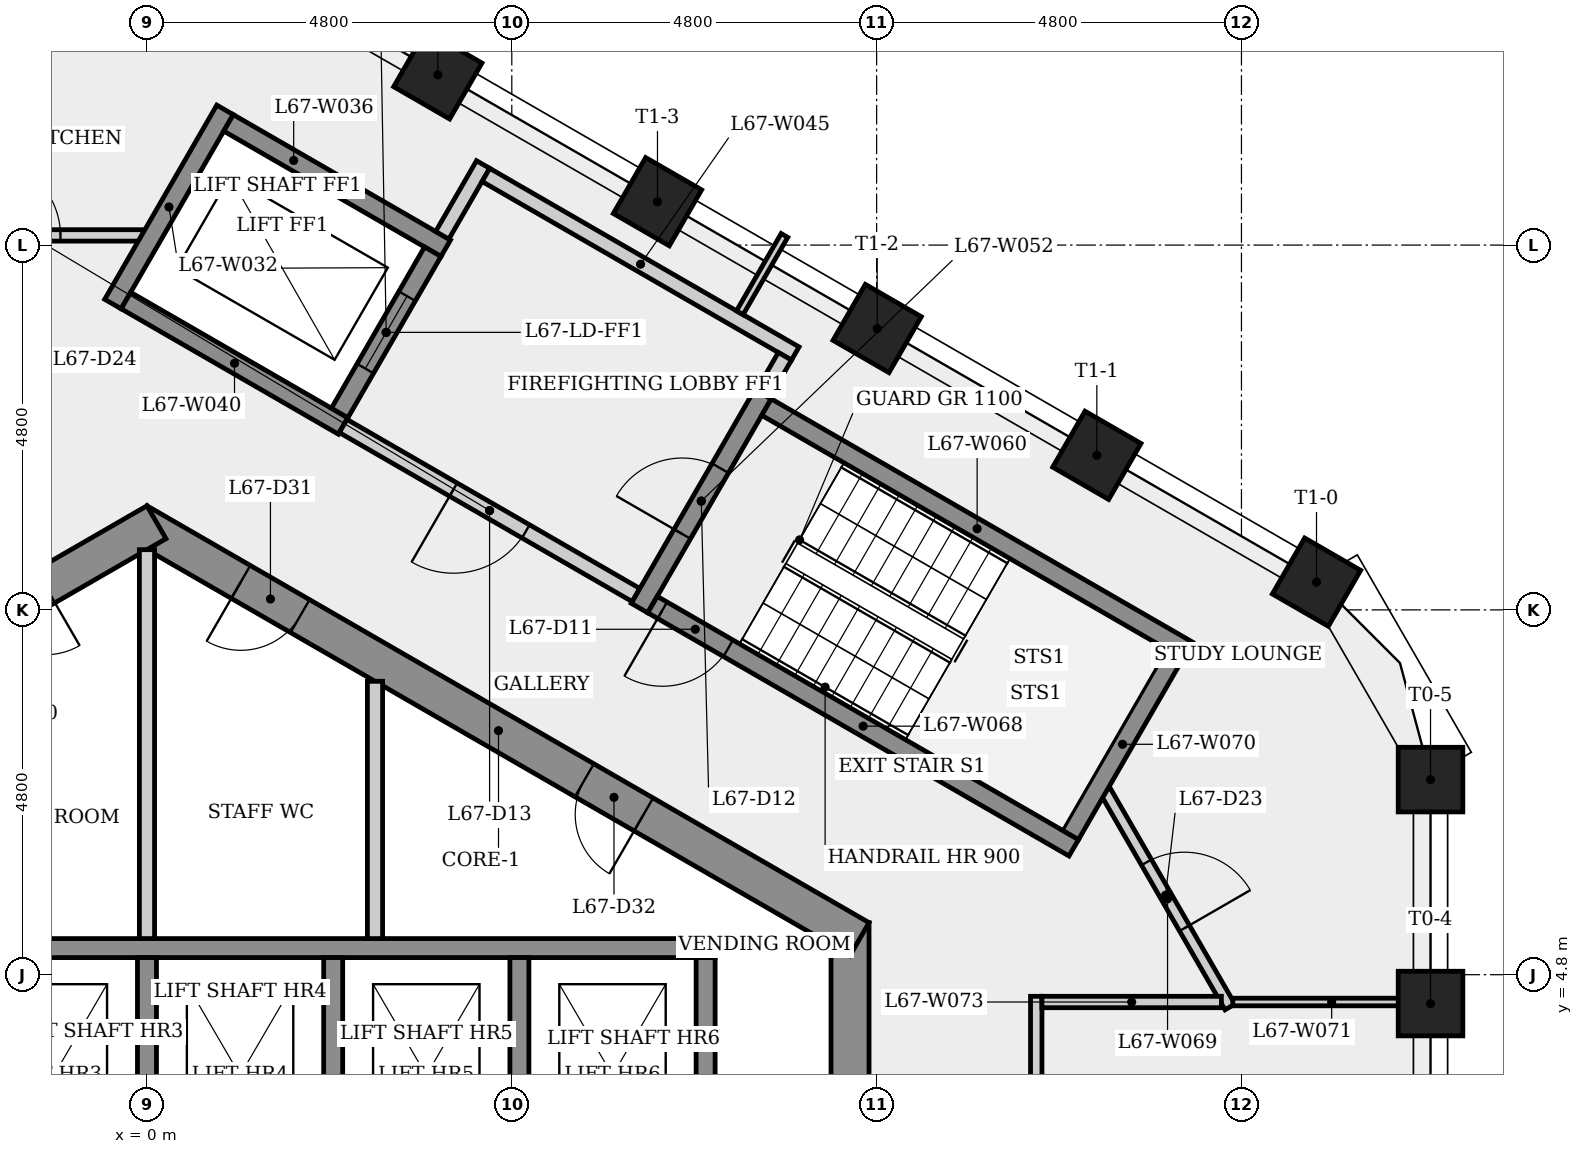
"""IFC4 building model, lengths in metres.
Left out: names, types, materials, properties, quantities, classifications, styles, units other than length and angle.
Written with IfcOpenShell. Run it as: python <this file> out.ifc"""

import sys

from ifc_helpers import new_model, si_unit, direction, frame, frame_2d, origin, origin_2d, place, context, subcontext, project, spatial, rectangle, extrude, element, fill, save


model = new_model("IFC4")
c1 = context("Model", 3, precision=1e-05, world=origin(), true_north=direction((0.0, 1.0)))
c2 = subcontext(c1, "Body", "Model", "MODEL_VIEW")
j1 = project(units=[si_unit("LENGTHUNIT", "METRE"), si_unit("PLANEANGLEUNIT", "RADIAN")], contexts=[c1])
p1 = place(None, origin())
s1 = spatial("IfcSite", under=j1, at=p1, CompositionType="ELEMENT")
p2 = place(p1, origin())
s2 = spatial("IfcBuilding", under=s1, at=p2, CompositionType="ELEMENT")
p3 = place(p2, frame((0.0, 0.0, 249.5)))
s3 = spatial("IfcBuildingStorey", under=s2, at=p3, CompositionType="ELEMENT", Elevation=249.5)
p4 = place(p3, frame((9.25, -5.485, 0.0), z_axis=(0.0, 0.0, 1.0), x_axis=(0.0, 1.0, 0.0)))
e1 = element("IfcWall", 1, at=p4, inside=s3, PredefinedType="SHEAR", context=c2, shape_type="SweptSolid", body=[
    extrude(rectangle(XDim=10.97, YDim=0.5, at=frame_2d((5.485, 0.0))), origin(), (0.0, 0.0, 1.0), 3.4),
])
p5 = place(p4, frame((4.685, 0.0, 0.0)))
e2 = element("IfcOpeningElement", 2, at=p5, cuts=e1, PredefinedType="OPENING", context=c2, shape_type="SweptSolid", body=[
    extrude(rectangle(XDim=1.6, YDim=2.1, at=frame_2d((0.8, 1.05))), frame((0.0, 0.26, 0.0), z_axis=(0.0, -1.0, 0.0), x_axis=(1.0, 0.0, 0.0)), (0.0, 0.0, 1.0), 0.52),
])
p6 = place(p3, frame((9.375, 5.268, 0.0), z_axis=(0.0, 0.0, 1.0), x_axis=(-0.866023993627, 0.500002442456, 0.0)))
e3 = element("IfcWall", 3, at=p6, inside=s3, PredefinedType="SHEAR", context=c2, shape_type="SweptSolid", body=[
    extrude(rectangle(XDim=10.97, YDim=0.5, at=frame_2d((5.485, 0.0))), origin(), (0.0, 0.0, 1.0), 3.4),
])
p7 = place(p6, frame((8.5, 0.0, 0.0)))
e4 = element("IfcOpeningElement", 4, at=p7, cuts=e3, PredefinedType="OPENING", context=c2, shape_type="SweptSolid", body=[
    extrude(rectangle(XDim=0.9, YDim=2.1, at=frame_2d((0.45, 1.05))), frame((0.0, 0.26, 0.0), z_axis=(0.0, -1.0, 0.0), x_axis=(1.0, 0.0, 0.0)), (0.0, 0.0, 1.0), 0.52),
])
p8 = place(p6, frame((3.28, 0.0, 0.0)))
e5 = element("IfcOpeningElement", 5, at=p8, cuts=e3, PredefinedType="OPENING", context=c2, shape_type="SweptSolid", body=[
    extrude(rectangle(XDim=0.9, YDim=2.1, at=frame_2d((0.45, 1.05))), frame((0.0, 0.26, 0.0), z_axis=(0.0, -1.0, 0.0), x_axis=(1.0, 0.0, 0.0)), (0.0, 0.0, 1.0), 0.52),
])
p9 = place(p3, frame((0.125, 10.753, 0.0), z_axis=(0.0, 0.0, 1.0), x_axis=(-0.866023993627, -0.500002442456, 0.0)))
e6 = element("IfcWall", 6, at=p9, inside=s3, PredefinedType="SHEAR", context=c2, shape_type="SweptSolid", body=[
    extrude(rectangle(XDim=10.97, YDim=0.5, at=frame_2d((5.485, 0.0))), origin(), (0.0, 0.0, 1.0), 3.4),
])
p10 = place(p9, frame((8.581, 0.0, 0.0)))
e7 = element("IfcOpeningElement", 7, at=p10, cuts=e6, PredefinedType="OPENING", context=c2, shape_type="SweptSolid", body=[
    extrude(rectangle(XDim=0.9, YDim=2.1, at=frame_2d((0.45, 1.05))), frame((0.0, 0.26, 0.0), z_axis=(0.0, -1.0, 0.0), x_axis=(1.0, 0.0, 0.0)), (0.0, 0.0, 1.0), 0.52),
])
p11 = place(p9, frame((1.687, 0.0, 0.0)))
e8 = element("IfcOpeningElement", 8, at=p11, cuts=e6, PredefinedType="OPENING", context=c2, shape_type="SweptSolid", body=[
    extrude(rectangle(XDim=0.9, YDim=2.1, at=frame_2d((0.45, 1.05))), frame((0.0, 0.26, 0.0), z_axis=(0.0, -1.0, 0.0), x_axis=(1.0, 0.0, 0.0)), (0.0, 0.0, 1.0), 0.52),
])
for number, where, z_axis, x_axis in (
    (9, (16.887, 4.42, 0.0), (0.0, 0.0, 1.0), (1.0, 0.0, 0.0)),
    (10, (16.887, 7.367, 0.0), (0.0, 0.0, 1.0), (1.0, 0.0, 0.0)),
    (11, (15.387, 9.965, 0.0), (0.0, 0.0, 1.0), (0.5, 0.866, 0.0)),
    (12, (12.497, 11.634, 0.0), (0.0, 0.0, 1.0), (0.5, 0.866, 0.0)),
    (13, (9.607, 13.302, 0.0), (0.0, 0.0, 1.0), (0.5, 0.866, 0.0)),
    (14, (6.717, 14.971, 0.0), (0.0, 0.0, 1.0), (0.5, 0.866, 0.0)),
    (15, (3.826, 16.64, 0.0), (0.0, 0.0, 1.0), (0.5, 0.866, 0.0)),
):
    element("IfcColumn", number, at=place(p3, frame(where, z_axis=z_axis, x_axis=x_axis)), inside=s3, PredefinedType="COLUMN", context=c2, shape_type="SweptSolid", body=[
        extrude(rectangle(XDim=0.85, YDim=0.85, at=origin_2d()), origin(), (0.0, 0.0, 1.0), 3.4),
    ])
p12 = place(p3, frame((-7.225, 5.15, 0.0), z_axis=(0.0, 0.0, 1.0), x_axis=(1.0, 0.0, 0.0)))
e16 = element("IfcWall", 16, at=p12, inside=s3, PredefinedType="SHEAR", context=c2, shape_type="SweptSolid", body=[
    extrude(rectangle(XDim=14.7, YDim=0.25, at=frame_2d((7.35, 0.0))), origin(), (0.0, 0.0, 1.0), 3.0),
])
p13 = place(p3, frame((-3.335, 14.528, 0.0), z_axis=(0.0, 0.0, 1.0), x_axis=(1.0, 0.0, 0.0)))
e17 = element("IfcWall", 17, at=p13, inside=s3, PredefinedType="PARTITIONING", context=c2, shape_type="SweptSolid", body=[
    extrude(rectangle(XDim=3.283, YDim=0.15, at=frame_2d((1.642, 0.0))), origin(), (0.0, 0.0, 1.0), 3.0),
])
p14 = place(p13, frame((1.197, 0.0, 0.0)))
e18 = element("IfcOpeningElement", 18, at=p14, cuts=e17, PredefinedType="OPENING", context=c2, shape_type="SweptSolid", body=[
    extrude(rectangle(XDim=1.0, YDim=2.1, at=frame_2d((0.5, 1.05))), frame((0.0, 0.085, 0.0), z_axis=(0.0, -1.0, 0.0), x_axis=(1.0, 0.0, 0.0)), (0.0, 0.0, 1.0), 0.17),
])
p15 = place(p3, frame((-0.448, 13.624, 0.0), z_axis=(0.0, 0.0, 1.0), x_axis=(0.500037662692, 0.866003658127, 0.0)))
e19 = element("IfcWall", 19, at=p15, inside=s3, PredefinedType="SHEAR", context=c2, shape_type="SweptSolid", body=[
    extrude(rectangle(XDim=2.95, YDim=0.25, at=frame_2d((1.475, 0.0))), origin(), (0.0, 0.0, 1.0), 3.0),
])
p16 = place(p3, frame((0.0, 5.025, 0.0), z_axis=(0.0, 0.0, 1.0), x_axis=(0.0, -1.0, 0.0)))
e20 = element("IfcWall", 20, at=p16, inside=s3, PredefinedType="SHEAR", context=c2, shape_type="SweptSolid", body=[
    extrude(rectangle(XDim=3.1, YDim=0.25, at=frame_2d((1.55, 0.0))), origin(), (0.0, 0.0, 1.0), 3.4),
])
p17 = place(p3, frame((0.0, 10.392, 0.0), z_axis=(0.0, 0.0, 1.0), x_axis=(0.0, -1.0, 0.0)))
e21 = element("IfcWall", 21, at=p17, inside=s3, PredefinedType="PARTITIONING", context=c2, shape_type="SweptSolid", body=[
    extrude(rectangle(XDim=5.117, YDim=0.2, at=frame_2d((2.559, 0.0))), origin(), (0.0, 0.0, 1.0), 3.0),
])
p18 = place(p3, frame((1.073, 16.008, 0.0), z_axis=(0.0, 0.0, 1.0), x_axis=(0.866040211805, -0.499974350878, 0.0)))
e22 = element("IfcWall", 22, at=p18, inside=s3, PredefinedType="SHEAR", context=c2, shape_type="SweptSolid", body=[
    extrude(rectangle(XDim=3.3, YDim=0.25, at=frame_2d((1.65, 0.0))), origin(), (0.0, 0.0, 1.0), 3.0),
])
p19 = place(p3, frame((2.45, 5.025, 0.0), z_axis=(0.0, 0.0, 1.0), x_axis=(0.0, -1.0, 0.0)))
e23 = element("IfcWall", 23, at=p19, inside=s3, PredefinedType="SHEAR", context=c2, shape_type="SweptSolid", body=[
    extrude(rectangle(XDim=3.1, YDim=0.25, at=frame_2d((1.55, 0.0))), origin(), (0.0, 0.0, 1.0), 3.4),
])
p20 = place(p3, frame((2.581, 12.02, 0.0), z_axis=(0.0, 0.0, 1.0), x_axis=(-0.866040211805, 0.499974350878, 0.0)))
e24 = element("IfcWall", 24, at=p20, inside=s3, PredefinedType="SHEAR", context=c2, shape_type="SweptSolid", body=[
    extrude(rectangle(XDim=3.3, YDim=0.25, at=frame_2d((1.65, 0.0))), origin(), (0.0, 0.0, 1.0), 3.0),
])
p21 = place(p3, frame((2.535, 12.191, 0.0), z_axis=(0.0, 0.0, 1.0), x_axis=(0.500061746146, 0.865989751695, 0.0)))
e25 = element("IfcWall", 25, at=p21, inside=s3, PredefinedType="SHEAR", context=c2, shape_type="SweptSolid", body=[
    extrude(rectangle(XDim=2.45, YDim=0.25, at=frame_2d((1.225, 0.0))), origin(), (0.0, 0.0, 1.0), 3.4),
])
p22 = place(p21, frame((0.675, 0.0, 0.0)))
e26 = element("IfcOpeningElement", 26, at=p22, cuts=e25, PredefinedType="OPENING", context=c2, shape_type="SweptSolid", body=[
    extrude(rectangle(XDim=1.1, YDim=2.1, at=frame_2d((0.55, 1.05))), frame((0.0, 0.135, 0.0), z_axis=(0.0, -1.0, 0.0), x_axis=(1.0, 0.0, 0.0)), (0.0, 0.0, 1.0), 0.27),
])
p23 = place(p3, frame((3.0, 8.66, 0.0), z_axis=(0.0, 0.0, 1.0), x_axis=(0.0, -1.0, 0.0)))
e27 = element("IfcWall", 27, at=p23, inside=s3, PredefinedType="PARTITIONING", context=c2, shape_type="SweptSolid", body=[
    extrude(rectangle(XDim=3.385, YDim=0.2, at=frame_2d((1.693, 0.0))), origin(), (0.0, 0.0, 1.0), 3.0),
])
p24 = place(p3, frame((3.885, 14.529, 0.0), z_axis=(0.0, 0.0, 1.0), x_axis=(0.499997628298, 0.866026773083, 0.0)))
e28 = element("IfcWall", 28, at=p24, inside=s3, PredefinedType="PARTITIONING", context=c2, shape_type="SweptSolid", body=[
    extrude(rectangle(XDim=1.075, YDim=0.2, at=frame_2d((0.538, 0.0))), origin(), (0.0, 0.0, 1.0), 3.0),
])
p25 = place(p3, frame((4.459, 15.323, 0.0), z_axis=(0.0, 0.0, 1.0), x_axis=(0.866016039709, -0.500016218704, 0.0)))
e29 = element("IfcWall", 29, at=p25, inside=s3, PredefinedType="PARTITIONING", context=c2, shape_type="SweptSolid", body=[
    extrude(rectangle(XDim=4.7, YDim=0.2, at=frame_2d((2.35, 0.0))), origin(), (0.0, 0.0, 1.0), 3.0),
])
p26 = place(p3, frame((4.9, 5.025, 0.0), z_axis=(0.0, 0.0, 1.0), x_axis=(0.0, -1.0, 0.0)))
e30 = element("IfcWall", 30, at=p26, inside=s3, PredefinedType="SHEAR", context=c2, shape_type="SweptSolid", body=[
    extrude(rectangle(XDim=3.1, YDim=0.25, at=frame_2d((1.55, 0.0))), origin(), (0.0, 0.0, 1.0), 3.4),
])
p27 = place(p3, frame((6.435, 9.795, 0.0), z_axis=(0.0, 0.0, 1.0), x_axis=(-0.866012907634, 0.500021643343, 0.0)))
e31 = element("IfcWall", 31, at=p27, inside=s3, PredefinedType="PARTITIONING", context=c2, shape_type="SweptSolid", body=[
    extrude(rectangle(XDim=4.45, YDim=0.2, at=frame_2d((2.225, 0.0))), origin(), (0.0, 0.0, 1.0), 3.0),
])
p28 = place(p27, frame((1.675, 0.0, 0.0)))
e32 = element("IfcOpeningElement", 32, at=p28, cuts=e31, PredefinedType="OPENING", context=c2, shape_type="SweptSolid", body=[
    extrude(rectangle(XDim=1.1, YDim=2.1, at=frame_2d((0.55, 1.05))), frame((0.0, 0.11, 0.0), z_axis=(0.0, -1.0, 0.0), x_axis=(1.0, 0.0, 0.0)), (0.0, 0.0, 1.0), 0.22),
])
p29 = place(p3, frame((6.48, 9.624, 0.0), z_axis=(0.0, 0.0, 1.0), x_axis=(0.500017246033, 0.866015446554, 0.0)))
e33 = element("IfcWall", 33, at=p29, inside=s3, PredefinedType="SHEAR", context=c2, shape_type="SweptSolid", body=[
    extrude(rectangle(XDim=3.25, YDim=0.25, at=frame_2d((1.625, 0.0))), origin(), (0.0, 0.0, 1.0), 3.0),
])
p30 = place(p29, frame((1.125, 0.0, 0.0)))
e34 = element("IfcOpeningElement", 34, at=p30, cuts=e33, PredefinedType="OPENING", context=c2, shape_type="SweptSolid", body=[
    extrude(rectangle(XDim=1.0, YDim=2.1, at=frame_2d((0.5, 1.05))), frame((0.0, 0.135, 0.0), z_axis=(0.0, -1.0, 0.0), x_axis=(1.0, 0.0, 0.0)), (0.0, 0.0, 1.0), 0.27),
])
p31 = place(p3, frame((7.35, 5.025, 0.0), z_axis=(0.0, 0.0, 1.0), x_axis=(0.0, -1.0, 0.0)))
e35 = element("IfcWall", 35, at=p31, inside=s3, PredefinedType="SHEAR", context=c2, shape_type="SweptSolid", body=[
    extrude(rectangle(XDim=3.1, YDim=0.25, at=frame_2d((1.55, 0.0))), origin(), (0.0, 0.0, 1.0), 3.4),
])
p32 = place(p3, frame((7.8, 13.51, 0.0), z_axis=(0.0, 0.0, 1.0), x_axis=(0.499962389866, 0.866047116916, 0.0)))
e36 = element("IfcWall", 36, at=p32, inside=s3, PredefinedType="PARTITIONING", context=c2, shape_type="SweptSolid", body=[
    extrude(rectangle(XDim=1.174, YDim=0.1, at=frame_2d((0.587, 0.0))), origin(), (0.0, 0.0, 1.0), 3.0),
])
p33 = place(p3, frame((8.151, 12.268, 0.0), z_axis=(0.0, 0.0, 1.0), x_axis=(0.866025499775, -0.499999833739, 0.0)))
e37 = element("IfcWall", 37, at=p33, inside=s3, PredefinedType="SHEAR", context=c2, shape_type="SweptSolid", body=[
    extrude(rectangle(XDim=6.4, YDim=0.25, at=frame_2d((3.2, 0.0))), origin(), (0.0, 0.0, 1.0), 3.0),
])
p34 = place(p3, frame((8.393, 12.937, 0.0), z_axis=(0.0, 0.0, 1.0), x_axis=(-0.500065409566, -0.86598763626, 0.0)))
e38 = element("IfcWall", 38, at=p34, inside=s3, PredefinedType="PARTITIONING", context=c2, shape_type="SweptSolid", body=[
    extrude(rectangle(XDim=0.575, YDim=0.2, at=frame_2d((0.288, 0.0))), origin(), (0.0, 0.0, 1.0), 3.0),
])
p35 = place(p3, frame((11.7, 4.516, 0.0), z_axis=(0.0, 0.0, 1.0), x_axis=(0.0, -1.0, 0.0)))
e39 = element("IfcWall", 39, at=p35, inside=s3, PredefinedType="PARTITIONING", context=c2, shape_type="SweptSolid", body=[
    extrude(rectangle(XDim=8.881, YDim=0.15, at=frame_2d((4.441, 0.0))), origin(), (0.0, 0.0, 1.0), 3.0),
])
p36 = place(p35, frame((3.993, 0.0, 0.0)))
e40 = element("IfcOpeningElement", 40, at=p36, cuts=e39, PredefinedType="OPENING", context=c2, shape_type="SweptSolid", body=[
    extrude(rectangle(XDim=1.0, YDim=2.1, at=frame_2d((0.5, 1.05))), frame((0.0, 0.085, 0.0), z_axis=(0.0, -1.0, 0.0), x_axis=(1.0, 0.0, 0.0)), (0.0, 0.0, 1.0), 0.17),
])
p37 = place(p3, frame((12.194, 6.47, 0.0), z_axis=(0.0, 0.0, 1.0), x_axis=(-0.866025499775, 0.499999833739, 0.0)))
e41 = element("IfcWall", 41, at=p37, inside=s3, PredefinedType="SHEAR", context=c2, shape_type="SweptSolid", body=[
    extrude(rectangle(XDim=6.4, YDim=0.25, at=frame_2d((3.2, 0.0))), origin(), (0.0, 0.0, 1.0), 3.0),
])
p38 = place(p37, frame((5.25, 0.0, 0.0)))
e42 = element("IfcOpeningElement", 42, at=p38, cuts=e41, PredefinedType="OPENING", context=c2, shape_type="SweptSolid", body=[
    extrude(rectangle(XDim=1.0, YDim=2.1, at=frame_2d((0.5, 1.05))), frame((0.0, 0.135, 0.0), z_axis=(0.0, -1.0, 0.0), x_axis=(1.0, 0.0, 0.0)), (0.0, 0.0, 1.0), 0.27),
])
p39 = place(p3, frame((12.607, 7.219, 0.0), z_axis=(0.0, 0.0, 1.0), x_axis=(0.499977771575, -0.866038236991, 0.0)))
e43 = element("IfcWall", 43, at=p39, inside=s3, PredefinedType="PARTITIONING", context=c2, shape_type="SweptSolid", body=[
    extrude(rectangle(XDim=3.283, YDim=0.15, at=frame_2d((1.642, 0.0))), origin(), (0.0, 0.0, 1.0), 3.0),
])
p40 = place(p39, frame((1.087, 0.0, 0.0)))
e44 = element("IfcOpeningElement", 44, at=p40, cuts=e43, PredefinedType="OPENING", context=c2, shape_type="SweptSolid", body=[
    extrude(rectangle(XDim=1.0, YDim=2.1, at=frame_2d((0.5, 1.05))), frame((0.0, 0.085, 0.0), z_axis=(0.0, -1.0, 0.0), x_axis=(1.0, 0.0, 0.0)), (0.0, 0.0, 1.0), 0.17),
])
p41 = place(p3, frame((12.148, 6.641, 0.0), z_axis=(0.0, 0.0, 1.0), x_axis=(0.500034990121, 0.866005201286, 0.0)))
e45 = element("IfcWall", 45, at=p41, inside=s3, PredefinedType="SHEAR", context=c2, shape_type="SweptSolid", body=[
    extrude(rectangle(XDim=2.75, YDim=0.25, at=frame_2d((1.375, 0.0))), origin(), (0.0, 0.0, 1.0), 3.0),
])
p42 = place(p3, frame((14.286, 4.441, 0.0), z_axis=(0.0, 0.0, 1.0), x_axis=(1.0, 0.0, 0.0)))
e46 = element("IfcWall", 46, at=p42, inside=s3, PredefinedType="PARTITIONING", context=c2, shape_type="SweptSolid", body=[
    extrude(rectangle(XDim=2.602, YDim=0.1, at=frame_2d((1.301, 0.0))), origin(), (0.0, 0.0, 1.0), 3.0),
])
p43 = place(p3, frame((14.136, 4.441, 0.0), z_axis=(0.0, 0.0, 1.0), x_axis=(-1.0, 0.0, 0.0)))
e47 = element("IfcWall", 47, at=p43, inside=s3, PredefinedType="PARTITIONING", context=c2, shape_type="SweptSolid", body=[
    extrude(rectangle(XDim=2.361, YDim=0.15, at=frame_2d((1.181, 0.0))), origin(), (0.0, 0.0, 1.0), 3.0),
])
p44 = place(p38, origin())
e48 = element("IfcDoor", 48, at=p44, inside=s3, OperationType="SINGLE_SWING_RIGHT", PredefinedType="DOOR", context=c2, shape_type="SweptSolid", body=[
    extrude(rectangle(XDim=1.0, YDim=2.1, at=frame_2d((0.5, 1.05))), frame((0.0, 0.025, 0.0), z_axis=(0.0, -1.0, 0.0), x_axis=(1.0, 0.0, 0.0)), (0.0, 0.0, 1.0), 0.05),
])
fill(e42, e48)
p45 = place(p30, origin())
e49 = element("IfcDoor", 49, at=p45, inside=s3, OperationType="SINGLE_SWING_LEFT", PredefinedType="DOOR", context=c2, shape_type="SweptSolid", body=[
    extrude(rectangle(XDim=1.0, YDim=2.1, at=frame_2d((0.5, 1.05))), frame((0.0, 0.025, 0.0), z_axis=(0.0, -1.0, 0.0), x_axis=(1.0, 0.0, 0.0)), (0.0, 0.0, 1.0), 0.05),
])
fill(e34, e49)
p46 = place(p28, origin())
e50 = element("IfcDoor", 50, at=p46, inside=s3, OperationType="SINGLE_SWING_RIGHT", PredefinedType="DOOR", context=c2, shape_type="SweptSolid", body=[
    extrude(rectangle(XDim=1.1, YDim=2.1, at=frame_2d((0.55, 1.05))), frame((0.0, 0.025, 0.0), z_axis=(0.0, -1.0, 0.0), x_axis=(1.0, 0.0, 0.0)), (0.0, 0.0, 1.0), 0.05),
])
fill(e32, e50)
p47 = place(p22, origin())
e51 = element("IfcDoor", 51, at=p47, inside=s3, OperationType="SLIDING_TO_LEFT", PredefinedType="DOOR", context=c2, shape_type="SweptSolid", body=[
    extrude(rectangle(XDim=1.1, YDim=2.1, at=frame_2d((0.55, 1.05))), frame((0.0, 0.025, 0.0), z_axis=(0.0, -1.0, 0.0), x_axis=(1.0, 0.0, 0.0)), (0.0, 0.0, 1.0), 0.05),
])
fill(e26, e51)
p48 = place(p40, origin())
e52 = element("IfcDoor", 52, at=p48, inside=s3, OperationType="SINGLE_SWING_RIGHT", PredefinedType="DOOR", context=c2, shape_type="SweptSolid", body=[
    extrude(rectangle(XDim=1.0, YDim=2.1, at=frame_2d((0.5, 1.05))), frame((0.0, 0.025, 0.0), z_axis=(0.0, -1.0, 0.0), x_axis=(1.0, 0.0, 0.0)), (0.0, 0.0, 1.0), 0.05),
])
fill(e44, e52)
p49 = place(p14, origin())
e53 = element("IfcDoor", 53, at=p49, inside=s3, OperationType="SINGLE_SWING_LEFT", PredefinedType="DOOR", context=c2, shape_type="SweptSolid", body=[
    extrude(rectangle(XDim=1.0, YDim=2.1, at=frame_2d((0.5, 1.05))), frame((0.0, 0.025, 0.0), z_axis=(0.0, -1.0, 0.0), x_axis=(1.0, 0.0, 0.0)), (0.0, 0.0, 1.0), 0.05),
])
fill(e18, e53)
p50 = place(p7, origin())
e54 = element("IfcDoor", 54, at=p50, inside=s3, OperationType="SINGLE_SWING_RIGHT", PredefinedType="DOOR", context=c2, shape_type="SweptSolid", body=[
    extrude(rectangle(XDim=0.9, YDim=2.1, at=frame_2d((0.45, 1.05))), frame((0.0, 0.025, 0.0), z_axis=(0.0, -1.0, 0.0), x_axis=(1.0, 0.0, 0.0)), (0.0, 0.0, 1.0), 0.05),
])
fill(e4, e54)
p51 = place(p8, origin())
e55 = element("IfcDoor", 55, at=p51, inside=s3, OperationType="SINGLE_SWING_LEFT", PredefinedType="DOOR", context=c2, shape_type="SweptSolid", body=[
    extrude(rectangle(XDim=0.9, YDim=2.1, at=frame_2d((0.45, 1.05))), frame((0.0, 0.025, 0.0), z_axis=(0.0, -1.0, 0.0), x_axis=(1.0, 0.0, 0.0)), (0.0, 0.0, 1.0), 0.05),
])
fill(e5, e55)
save(model, sys.argv[1])
